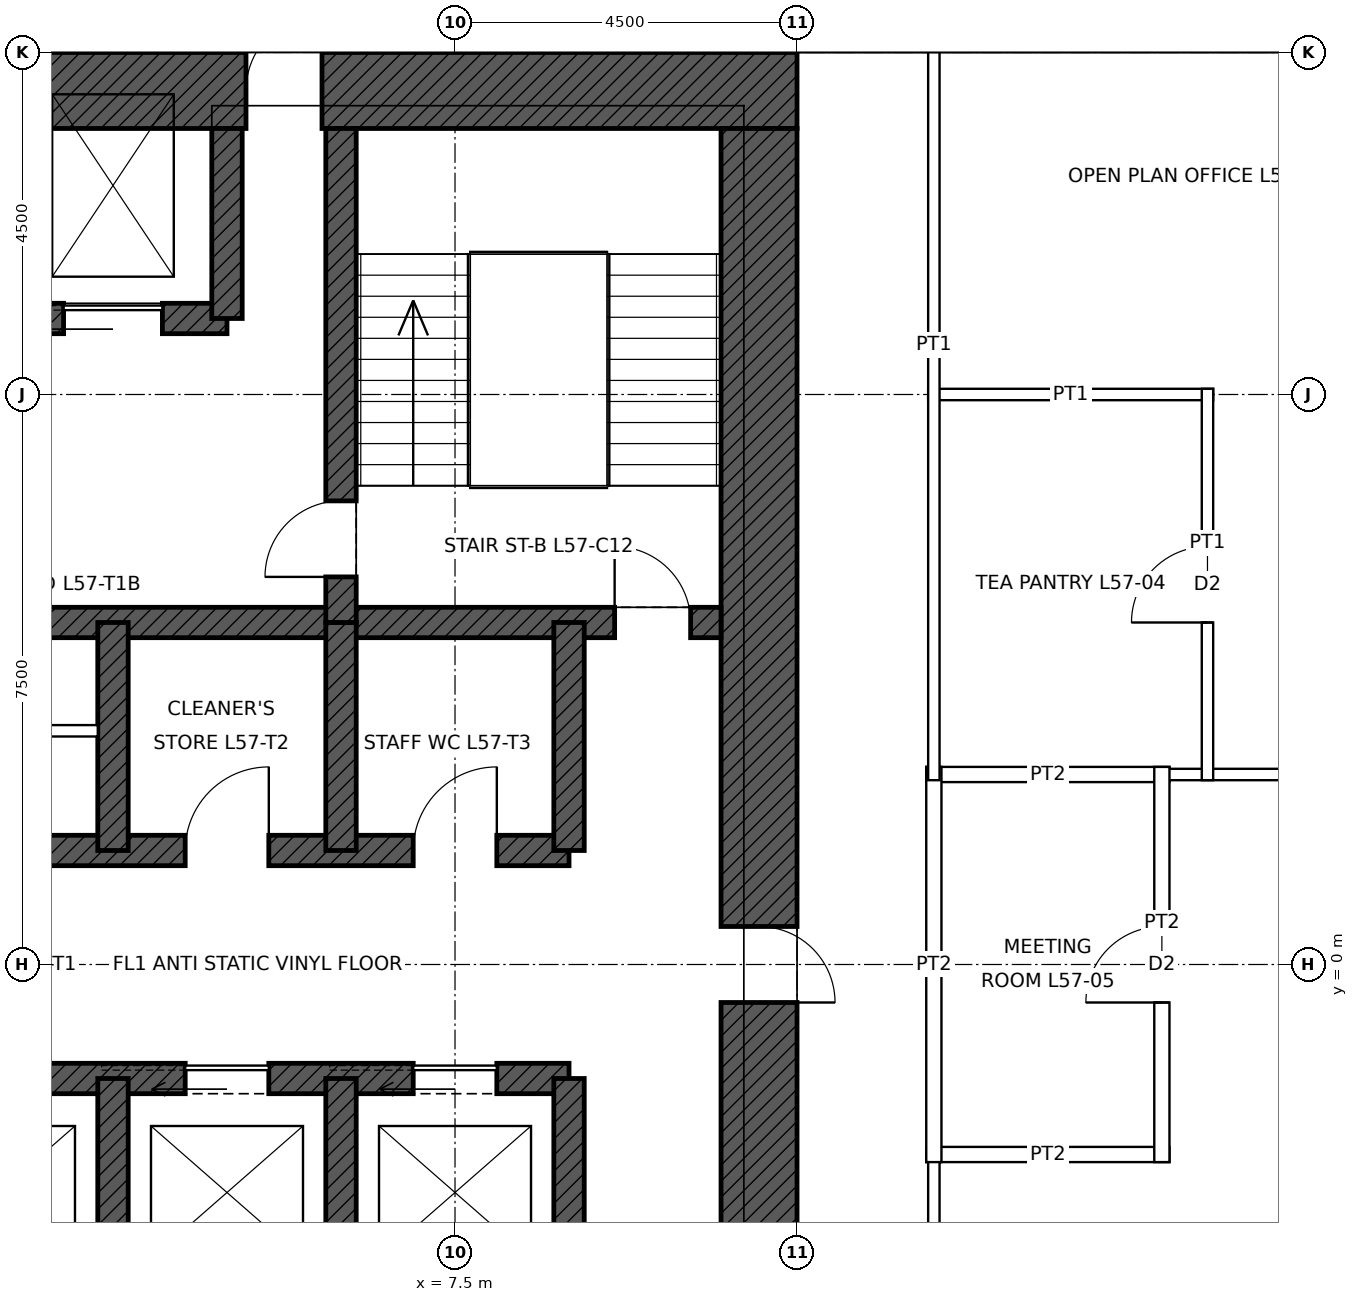
"""IFC4 building model, lengths in metres.
Left out: names, types, materials, properties, quantities, classifications, styles, units other than length and angle.
Written with IfcOpenShell. Run it as: python <this file> out.ifc"""

import sys

from ifc_helpers import new_model, si_unit, direction, frame, frame_2d, origin, place, context, subcontext, project, spatial, rectangle, extrude, element, fill, save


model = new_model("IFC4")
c1 = context("Model", 3, precision=1e-05, world=origin(), true_north=direction((0.0, 1.0)))
c2 = subcontext(c1, "Body", "Model", "MODEL_VIEW")
j1 = project(units=[si_unit("LENGTHUNIT", "METRE"), si_unit("PLANEANGLEUNIT", "RADIAN")], contexts=[c1])
p1 = place(None, origin())
s1 = spatial("IfcSite", under=j1, at=p1, CompositionType="ELEMENT")
p2 = place(p1, origin())
s2 = spatial("IfcBuilding", under=s1, at=p2, CompositionType="ELEMENT")
p3 = place(p2, frame((0.0, 0.0, 263.9)))
s3 = spatial("IfcBuildingStorey", under=s2, at=p3, CompositionType="ELEMENT", Elevation=263.9)
p4 = place(p3, frame((-12.0, 11.5, 0.0), z_axis=(0.0, 0.0, 1.0), x_axis=(1.0, 0.0, 0.0)))
e1 = element("IfcWall", 1, at=p4, inside=s3, PredefinedType="SHEAR", context=c2, shape_type="SweptSolid", body=[
    extrude(rectangle(XDim=24.0, YDim=1.0, at=frame_2d((12.0, 0.0))), origin(), (0.0, 0.0, 1.0), 4.0),
])
p5 = place(p4, frame((6.25, 0.0, 0.0)))
e2 = element("IfcOpeningElement", 2, at=p5, cuts=e1, PredefinedType="OPENING", context=c2, shape_type="SweptSolid", body=[
    extrude(rectangle(XDim=1.0, YDim=2.4, at=frame_2d((0.5, 1.2))), frame((0.0, 0.51, 0.0), z_axis=(0.0, -1.0, 0.0), x_axis=(1.0, 0.0, 0.0)), (0.0, 0.0, 1.0), 1.02),
])
p6 = place(p4, frame((16.75, 0.0, 0.0)))
e3 = element("IfcOpeningElement", 3, at=p6, cuts=e1, PredefinedType="OPENING", context=c2, shape_type="SweptSolid", body=[
    extrude(rectangle(XDim=1.0, YDim=2.4, at=frame_2d((0.5, 1.2))), frame((0.0, 0.51, 0.0), z_axis=(0.0, -1.0, 0.0), x_axis=(1.0, 0.0, 0.0)), (0.0, 0.0, 1.0), 1.02),
])
p7 = place(p3, frame((11.5, 11.0, 0.0), z_axis=(0.0, 0.0, 1.0), x_axis=(0.0, -1.0, 0.0)))
e4 = element("IfcWall", 4, at=p7, inside=s3, PredefinedType="SHEAR", context=c2, shape_type="SweptSolid", body=[
    extrude(rectangle(XDim=22.0, YDim=1.0, at=frame_2d((11.0, 0.0))), origin(), (0.0, 0.0, 1.0), 4.0),
])
p8 = place(p7, frame((10.5, 0.0, 0.0)))
e5 = element("IfcOpeningElement", 5, at=p8, cuts=e4, PredefinedType="OPENING", context=c2, shape_type="SweptSolid", body=[
    extrude(rectangle(XDim=1.0, YDim=2.4, at=frame_2d((0.5, 1.2))), frame((0.0, 0.51, 0.0), z_axis=(0.0, -1.0, 0.0), x_axis=(1.0, 0.0, 0.0)), (0.0, 0.0, 1.0), 1.02),
])
p9 = place(p3, frame((-11.0, 4.5, 0.0), z_axis=(0.0, 0.0, 1.0), x_axis=(1.0, 0.0, 0.0)))
e6 = element("IfcWall", 6, at=p9, inside=s3, PredefinedType="SHEAR", context=c2, shape_type="SweptSolid", body=[
    extrude(rectangle(XDim=22.0, YDim=0.4, at=frame_2d((11.0, 0.0))), origin(), (0.0, 0.0, 1.0), 4.0),
])
p10 = place(p9, frame((0.4, 0.0, 0.0)))
e7 = element("IfcOpeningElement", 7, at=p10, cuts=e6, PredefinedType="OPENING", context=c2, shape_type="SweptSolid", body=[
    extrude(rectangle(XDim=1.0, YDim=2.1, at=frame_2d((0.5, 1.05))), frame((0.0, 0.21, 0.0), z_axis=(0.0, -1.0, 0.0), x_axis=(1.0, 0.0, 0.0)), (0.0, 0.0, 1.0), 0.42),
])
p11 = place(p9, frame((20.6, 0.0, 0.0)))
e8 = element("IfcOpeningElement", 8, at=p11, cuts=e6, PredefinedType="OPENING", context=c2, shape_type="SweptSolid", body=[
    extrude(rectangle(XDim=1.0, YDim=2.1, at=frame_2d((0.5, 1.05))), frame((0.0, 0.21, 0.0), z_axis=(0.0, -1.0, 0.0), x_axis=(1.0, 0.0, 0.0)), (0.0, 0.0, 1.0), 0.42),
])
p12 = place(p3, frame((-9.0, 1.5, 0.0), z_axis=(0.0, 0.0, 1.0), x_axis=(1.0, 0.0, 0.0)))
e9 = element("IfcWall", 9, at=p12, inside=s3, PredefinedType="SHEAR", context=c2, shape_type="SweptSolid", body=[
    extrude(rectangle(XDim=18.0, YDim=0.4, at=frame_2d((9.0, 0.0))), origin(), (0.0, 0.0, 1.0), 4.0),
])
p13 = place(p12, frame((0.95, 0.0, 0.0)))
e10 = element("IfcOpeningElement", 10, at=p13, cuts=e9, PredefinedType="OPENING", context=c2, shape_type="SweptSolid", body=[
    extrude(rectangle(XDim=1.1, YDim=2.1, at=frame_2d((0.55, 1.05))), frame((0.0, 0.21, 0.0), z_axis=(0.0, -1.0, 0.0), x_axis=(1.0, 0.0, 0.0)), (0.0, 0.0, 1.0), 0.42),
])
p14 = place(p12, frame((3.95, 0.0, 0.0)))
e11 = element("IfcOpeningElement", 11, at=p14, cuts=e9, PredefinedType="OPENING", context=c2, shape_type="SweptSolid", body=[
    extrude(rectangle(XDim=1.1, YDim=2.1, at=frame_2d((0.55, 1.05))), frame((0.0, 0.21, 0.0), z_axis=(0.0, -1.0, 0.0), x_axis=(1.0, 0.0, 0.0)), (0.0, 0.0, 1.0), 0.42),
])
p15 = place(p12, frame((6.95, 0.0, 0.0)))
e12 = element("IfcOpeningElement", 12, at=p15, cuts=e9, PredefinedType="OPENING", context=c2, shape_type="SweptSolid", body=[
    extrude(rectangle(XDim=1.1, YDim=2.1, at=frame_2d((0.55, 1.05))), frame((0.0, 0.21, 0.0), z_axis=(0.0, -1.0, 0.0), x_axis=(1.0, 0.0, 0.0)), (0.0, 0.0, 1.0), 0.42),
])
p16 = place(p12, frame((9.95, 0.0, 0.0)))
e13 = element("IfcOpeningElement", 13, at=p16, cuts=e9, PredefinedType="OPENING", context=c2, shape_type="SweptSolid", body=[
    extrude(rectangle(XDim=1.1, YDim=2.1, at=frame_2d((0.55, 1.05))), frame((0.0, 0.21, 0.0), z_axis=(0.0, -1.0, 0.0), x_axis=(1.0, 0.0, 0.0)), (0.0, 0.0, 1.0), 0.42),
])
p17 = place(p12, frame((12.95, 0.0, 0.0)))
e14 = element("IfcOpeningElement", 14, at=p17, cuts=e9, PredefinedType="OPENING", context=c2, shape_type="SweptSolid", body=[
    extrude(rectangle(XDim=1.1, YDim=2.1, at=frame_2d((0.55, 1.05))), frame((0.0, 0.21, 0.0), z_axis=(0.0, -1.0, 0.0), x_axis=(1.0, 0.0, 0.0)), (0.0, 0.0, 1.0), 0.42),
])
p18 = place(p12, frame((15.95, 0.0, 0.0)))
e15 = element("IfcOpeningElement", 15, at=p18, cuts=e9, PredefinedType="OPENING", context=c2, shape_type="SweptSolid", body=[
    extrude(rectangle(XDim=1.1, YDim=2.1, at=frame_2d((0.55, 1.05))), frame((0.0, 0.21, 0.0), z_axis=(0.0, -1.0, 0.0), x_axis=(1.0, 0.0, 0.0)), (0.0, 0.0, 1.0), 0.42),
])
p19 = place(p3, frame((-9.0, -1.5, 0.0), z_axis=(0.0, 0.0, 1.0), x_axis=(1.0, 0.0, 0.0)))
e16 = element("IfcWall", 16, at=p19, inside=s3, PredefinedType="SHEAR", context=c2, shape_type="SweptSolid", body=[
    extrude(rectangle(XDim=18.0, YDim=0.4, at=frame_2d((9.0, 0.0))), origin(), (0.0, 0.0, 1.0), 4.0),
])
p20 = place(p19, frame((9.95, 0.0, 0.0)))
e17 = element("IfcOpeningElement", 17, at=p20, cuts=e16, PredefinedType="OPENING", context=c2, shape_type="SweptSolid", body=[
    extrude(rectangle(XDim=1.1, YDim=2.1, at=frame_2d((0.55, 1.05))), frame((0.0, 0.21, 0.0), z_axis=(0.0, -1.0, 0.0), x_axis=(1.0, 0.0, 0.0)), (0.0, 0.0, 1.0), 0.42),
])
p21 = place(p19, frame((12.95, 0.0, 0.0)))
e18 = element("IfcOpeningElement", 18, at=p21, cuts=e16, PredefinedType="OPENING", context=c2, shape_type="SweptSolid", body=[
    extrude(rectangle(XDim=1.1, YDim=2.1, at=frame_2d((0.55, 1.05))), frame((0.0, 0.21, 0.0), z_axis=(0.0, -1.0, 0.0), x_axis=(1.0, 0.0, 0.0)), (0.0, 0.0, 1.0), 0.42),
])
p22 = place(p19, frame((15.95, 0.0, 0.0)))
e19 = element("IfcOpeningElement", 19, at=p22, cuts=e16, PredefinedType="OPENING", context=c2, shape_type="SweptSolid", body=[
    extrude(rectangle(XDim=1.1, YDim=2.1, at=frame_2d((0.55, 1.05))), frame((0.0, 0.21, 0.0), z_axis=(0.0, -1.0, 0.0), x_axis=(1.0, 0.0, 0.0)), (0.0, 0.0, 1.0), 0.42),
])
p23 = place(p19, frame((0.95, 0.0, 0.0)))
e20 = element("IfcOpeningElement", 20, at=p23, cuts=e16, PredefinedType="OPENING", context=c2, shape_type="SweptSolid", body=[
    extrude(rectangle(XDim=1.1, YDim=2.1, at=frame_2d((0.55, 1.05))), frame((0.0, 0.21, 0.0), z_axis=(0.0, -1.0, 0.0), x_axis=(1.0, 0.0, 0.0)), (0.0, 0.0, 1.0), 0.42),
])
p24 = place(p19, frame((3.95, 0.0, 0.0)))
e21 = element("IfcOpeningElement", 21, at=p24, cuts=e16, PredefinedType="OPENING", context=c2, shape_type="SweptSolid", body=[
    extrude(rectangle(XDim=1.1, YDim=2.1, at=frame_2d((0.55, 1.05))), frame((0.0, 0.21, 0.0), z_axis=(0.0, -1.0, 0.0), x_axis=(1.0, 0.0, 0.0)), (0.0, 0.0, 1.0), 0.42),
])
p25 = place(p19, frame((6.95, 0.0, 0.0)))
e22 = element("IfcOpeningElement", 22, at=p25, cuts=e16, PredefinedType="OPENING", context=c2, shape_type="SweptSolid", body=[
    extrude(rectangle(XDim=1.1, YDim=2.1, at=frame_2d((0.55, 1.05))), frame((0.0, 0.21, 0.0), z_axis=(0.0, -1.0, 0.0), x_axis=(1.0, 0.0, 0.0)), (0.0, 0.0, 1.0), 0.42),
])
p26 = place(p3, frame((-4.5, 8.5, 0.0), z_axis=(0.0, 0.0, 1.0), x_axis=(1.0, 0.0, 0.0)))
e23 = element("IfcWall", 23, at=p26, inside=s3, PredefinedType="SHEAR", context=c2, shape_type="SweptSolid", body=[
    extrude(rectangle(XDim=9.0, YDim=0.4, at=frame_2d((4.5, 0.0))), origin(), (0.0, 0.0, 1.0), 4.0),
])
p27 = place(p26, frame((0.85, 0.0, 0.0)))
e24 = element("IfcOpeningElement", 24, at=p27, cuts=e23, PredefinedType="OPENING", context=c2, shape_type="SweptSolid", body=[
    extrude(rectangle(XDim=1.3, YDim=2.4, at=frame_2d((0.65, 1.2))), frame((0.0, 0.21, 0.0), z_axis=(0.0, -1.0, 0.0), x_axis=(1.0, 0.0, 0.0)), (0.0, 0.0, 1.0), 0.42),
])
p28 = place(p26, frame((6.85, 0.0, 0.0)))
e25 = element("IfcOpeningElement", 25, at=p28, cuts=e23, PredefinedType="OPENING", context=c2, shape_type="SweptSolid", body=[
    extrude(rectangle(XDim=1.3, YDim=2.4, at=frame_2d((0.65, 1.2))), frame((0.0, 0.21, 0.0), z_axis=(0.0, -1.0, 0.0), x_axis=(1.0, 0.0, 0.0)), (0.0, 0.0, 1.0), 0.42),
])
p29 = place(p26, frame((3.85, 0.0, 0.0)))
e26 = element("IfcOpeningElement", 26, at=p29, cuts=e23, PredefinedType="OPENING", context=c2, shape_type="SweptSolid", body=[
    extrude(rectangle(XDim=1.3, YDim=2.4, at=frame_2d((0.65, 1.2))), frame((0.0, 0.21, 0.0), z_axis=(0.0, -1.0, 0.0), x_axis=(1.0, 0.0, 0.0)), (0.0, 0.0, 1.0), 0.42),
])
for number, where, z_axis, x_axis in (
    (27, (9.0, 1.5, 0.0), (0.0, 0.0, 1.0), (0.0, 1.0, 0.0)),
    (28, (9.0, -4.5, 0.0), (0.0, 0.0, 1.0), (0.0, 1.0, 0.0)),
    (29, (3.0, 1.5, 0.0), (0.0, 0.0, 1.0), (0.0, 1.0, 0.0)),
    (30, (6.0, 1.5, 0.0), (0.0, 0.0, 1.0), (0.0, 1.0, 0.0)),
    (31, (3.0, -4.5, 0.0), (0.0, 0.0, 1.0), (0.0, 1.0, 0.0)),
    (32, (6.0, -4.5, 0.0), (0.0, 0.0, 1.0), (0.0, 1.0, 0.0)),
):
    element("IfcWall", number, at=place(p3, frame(where, z_axis=z_axis, x_axis=x_axis)), inside=s3, PredefinedType="SHEAR", context=c2, shape_type="SweptSolid", body=[
        extrude(rectangle(XDim=3.0, YDim=0.4, at=frame_2d((1.5, 0.0))), origin(), (0.0, 0.0, 1.0), 4.0),
    ])
p30 = place(p3, frame((6.0, 4.5, 0.0), z_axis=(0.0, 0.0, 1.0), x_axis=(0.0, 1.0, 0.0)))
e33 = element("IfcWall", 33, at=p30, inside=s3, PredefinedType="SHEAR", context=c2, shape_type="SweptSolid", body=[
    extrude(rectangle(XDim=6.5, YDim=0.4, at=frame_2d((3.25, 0.0))), origin(), (0.0, 0.0, 1.0), 4.0),
])
p31 = place(p30, frame((0.6, 0.0, 0.0)))
e34 = element("IfcOpeningElement", 34, at=p31, cuts=e33, PredefinedType="OPENING", context=c2, shape_type="SweptSolid", body=[
    extrude(rectangle(XDim=1.0, YDim=2.1, at=frame_2d((0.5, 1.05))), frame((0.0, 0.21, 0.0), z_axis=(0.0, -1.0, 0.0), x_axis=(1.0, 0.0, 0.0)), (0.0, 0.0, 1.0), 0.42),
])
p32 = place(p3, frame((4.5, 8.5, 0.0), z_axis=(0.0, 0.0, 1.0), x_axis=(0.0, 1.0, 0.0)))
e35 = element("IfcWall", 35, at=p32, inside=s3, PredefinedType="SHEAR", context=c2, shape_type="SweptSolid", body=[
    extrude(rectangle(XDim=2.5, YDim=0.4, at=frame_2d((1.25, 0.0))), origin(), (0.0, 0.0, 1.0), 4.0),
])
for number, where, z_axis, x_axis in (
    (36, (13.7, -2.5, 0.0), (0.0, 0.0, 1.0), (1.0, 0.0, 0.0)),
    (37, (13.7, 2.5, 0.0), (0.0, 0.0, 1.0), (1.0, 0.0, 0.0)),
):
    element("IfcWall", number, at=place(p3, frame(where, z_axis=z_axis, x_axis=x_axis)), inside=s3, PredefinedType="PARTITIONING", context=c2, shape_type="SweptSolid", body=[
        extrude(rectangle(XDim=3.2, YDim=0.2, at=frame_2d((1.6, 0.0))), origin(), (0.0, 0.0, 1.0), 3.85),
    ])
p33 = place(p3, frame((16.725, 2.5, 0.0), z_axis=(0.0, 0.0, 1.0), x_axis=(1.0, 0.0, 0.0)))
e38 = element("IfcWall", 38, at=p33, inside=s3, PredefinedType="PARTITIONING", context=c2, shape_type="SweptSolid", body=[
    extrude(rectangle(XDim=3.925, YDim=0.15, at=frame_2d((1.962, 0.0))), origin(), (0.0, 0.0, 1.0), 3.85),
])
p34 = place(p3, frame((13.725, 7.5, 0.0), z_axis=(0.0, 0.0, 1.0), x_axis=(1.0, 0.0, 0.0)))
e39 = element("IfcWall", 39, at=p34, inside=s3, PredefinedType="PARTITIONING", context=c2, shape_type="SweptSolid", body=[
    extrude(rectangle(XDim=3.75, YDim=0.15, at=frame_2d((1.875, 0.0))), origin(), (0.0, 0.0, 1.0), 3.243),
])
p35 = place(p3, frame((13.8, -13.875, 0.0), z_axis=(0.0, 0.0, 1.0), x_axis=(0.0, 1.0, 0.0)))
e40 = element("IfcWall", 40, at=p35, inside=s3, PredefinedType="PARTITIONING", context=c2, shape_type="SweptSolid", body=[
    extrude(rectangle(XDim=11.45, YDim=0.15, at=frame_2d((5.725, 0.0))), origin(), (0.0, 0.0, 1.0), 3.85),
])
p36 = place(p35, frame((5.225, 0.0, 0.0)))
e41 = element("IfcOpeningElement", 41, at=p36, cuts=e40, PredefinedType="OPENING", context=c2, shape_type="SweptSolid", body=[
    extrude(rectangle(XDim=1.0, YDim=2.4, at=frame_2d((0.5, 1.2))), frame((0.0, 0.085, 0.0), z_axis=(0.0, -1.0, 0.0), x_axis=(1.0, 0.0, 0.0)), (0.0, 0.0, 1.0), 0.17),
])
p37 = place(p3, frame((13.8, -2.6, 0.0), z_axis=(0.0, 0.0, 1.0), x_axis=(0.0, 1.0, 0.0)))
e42 = element("IfcWall", 42, at=p37, inside=s3, PredefinedType="PARTITIONING", context=c2, shape_type="SweptSolid", body=[
    extrude(rectangle(XDim=5.2, YDim=0.2, at=frame_2d((2.6, 0.0))), origin(), (0.0, 0.0, 1.0), 3.85),
])
p38 = place(p3, frame((13.8, 2.425, 0.0), z_axis=(0.0, 0.0, 1.0), x_axis=(0.0, 1.0, 0.0)))
e43 = element("IfcWall", 43, at=p38, inside=s3, PredefinedType="PARTITIONING", context=c2, shape_type="SweptSolid", body=[
    extrude(rectangle(XDim=11.45, YDim=0.15, at=frame_2d((5.725, 0.0))), origin(), (0.0, 0.0, 1.0), 3.85),
])
p39 = place(p3, frame((16.8, -2.6, 0.0), z_axis=(0.0, 0.0, 1.0), x_axis=(0.0, 1.0, 0.0)))
e44 = element("IfcWall", 44, at=p39, inside=s3, PredefinedType="PARTITIONING", context=c2, shape_type="SweptSolid", body=[
    extrude(rectangle(XDim=5.2, YDim=0.2, at=frame_2d((2.6, 0.0))), origin(), (0.0, 0.0, 1.0), 3.85),
])
p40 = place(p39, frame((2.1, 0.0, 0.0)))
e45 = element("IfcOpeningElement", 45, at=p40, cuts=e44, PredefinedType="OPENING", context=c2, shape_type="SweptSolid", body=[
    extrude(rectangle(XDim=1.0, YDim=2.1, at=frame_2d((0.5, 1.05))), frame((0.0, 0.11, 0.0), z_axis=(0.0, -1.0, 0.0), x_axis=(1.0, 0.0, 0.0)), (0.0, 0.0, 1.0), 0.22),
])
p41 = place(p3, frame((17.4, 2.425, 0.0), z_axis=(0.0, 0.0, 1.0), x_axis=(0.0, 1.0, 0.0)))
e46 = element("IfcWall", 46, at=p41, inside=s3, PredefinedType="PARTITIONING", context=c2, shape_type="SweptSolid", body=[
    extrude(rectangle(XDim=5.15, YDim=0.15, at=frame_2d((2.575, 0.0))), origin(), (0.0, 0.0, 1.0), 3.85),
])
p42 = place(p41, frame((2.075, 0.0, 0.0)))
e47 = element("IfcOpeningElement", 47, at=p42, cuts=e46, PredefinedType="OPENING", context=c2, shape_type="SweptSolid", body=[
    extrude(rectangle(XDim=1.0, YDim=2.1, at=frame_2d((0.5, 1.05))), frame((0.0, 0.085, 0.0), z_axis=(0.0, -1.0, 0.0), x_axis=(1.0, 0.0, 0.0)), (0.0, 0.0, 1.0), 0.17),
])
p43 = place(p3, frame((0.2, 3.075, 0.0), z_axis=(0.0, 0.0, 1.0), x_axis=(1.0, 0.0, 0.0)))
e48 = element("IfcWall", 48, at=p43, inside=s3, PredefinedType="PARTITIONING", context=c2, shape_type="SweptSolid", body=[
    extrude(rectangle(XDim=2.6, YDim=0.15, at=frame_2d((1.3, 0.0))), origin(), (0.0, 0.0, 1.0), 3.75),
])
p44 = place(p43, frame((0.85, 0.0, 0.0)))
e49 = element("IfcOpeningElement", 49, at=p44, cuts=e48, PredefinedType="OPENING", context=c2, shape_type="SweptSolid", body=[
    extrude(rectangle(XDim=0.9, YDim=2.1, at=frame_2d((0.45, 1.05))), frame((0.0, 0.085, 0.0), z_axis=(0.0, -1.0, 0.0), x_axis=(1.0, 0.0, 0.0)), (0.0, 0.0, 1.0), 0.17),
])
p45 = place(p11, origin())
e50 = element("IfcDoor", 50, at=p45, inside=s3, OperationType="SINGLE_SWING_LEFT", PredefinedType="DOOR", context=c2, shape_type="SweptSolid", body=[
    extrude(rectangle(XDim=1.0, YDim=2.1, at=frame_2d((0.5, 1.05))), frame((0.0, 0.025, 0.0), z_axis=(0.0, -1.0, 0.0), x_axis=(1.0, 0.0, 0.0)), (0.0, 0.0, 1.0), 0.05),
])
fill(e8, e50)
p46 = place(p31, origin())
e51 = element("IfcDoor", 51, at=p46, inside=s3, OperationType="SINGLE_SWING_LEFT", PredefinedType="DOOR", context=c2, shape_type="SweptSolid", body=[
    extrude(rectangle(XDim=1.0, YDim=2.1, at=frame_2d((0.5, 1.05))), frame((0.0, 0.025, 0.0), z_axis=(0.0, -1.0, 0.0), x_axis=(1.0, 0.0, 0.0)), (0.0, 0.0, 1.0), 0.05),
])
fill(e34, e51)
p47 = place(p6, origin())
e52 = element("IfcDoor", 52, at=p47, inside=s3, OperationType="SINGLE_SWING_RIGHT", PredefinedType="DOOR", context=c2, shape_type="SweptSolid", body=[
    extrude(rectangle(XDim=1.0, YDim=2.4, at=frame_2d((0.5, 1.2))), frame((0.0, 0.485, 0.0), z_axis=(0.0, -1.0, 0.0), x_axis=(1.0, 0.0, 0.0)), (0.0, 0.0, 1.0), 0.05),
])
fill(e3, e52)
p48 = place(p8, origin())
e53 = element("IfcDoor", 53, at=p48, inside=s3, OperationType="SINGLE_SWING_RIGHT", PredefinedType="DOOR", context=c2, shape_type="SweptSolid", body=[
    extrude(rectangle(XDim=1.0, YDim=2.4, at=frame_2d((0.5, 1.2))), frame((0.0, 0.485, 0.0), z_axis=(0.0, -1.0, 0.0), x_axis=(1.0, 0.0, 0.0)), (0.0, 0.0, 1.0), 0.05),
])
fill(e5, e53)
p49 = place(p28, origin())
e54 = element("IfcDoor", 54, at=p49, inside=s3, OperationType="SLIDING_TO_LEFT", PredefinedType="DOOR", context=c2, shape_type="SweptSolid", body=[
    extrude(rectangle(XDim=1.3, YDim=2.4, at=frame_2d((0.65, 1.2))), frame((0.0, 0.025, 0.0), z_axis=(0.0, -1.0, 0.0), x_axis=(1.0, 0.0, 0.0)), (0.0, 0.0, 1.0), 0.05),
])
fill(e25, e54)
p50 = place(p21, origin())
e55 = element("IfcDoor", 55, at=p50, inside=s3, OperationType="SLIDING_TO_LEFT", PredefinedType="DOOR", context=c2, shape_type="SweptSolid", body=[
    extrude(rectangle(XDim=1.1, YDim=2.1, at=frame_2d((0.55, 1.05))), frame((0.0, 0.025, 0.0), z_axis=(0.0, -1.0, 0.0), x_axis=(1.0, 0.0, 0.0)), (0.0, 0.0, 1.0), 0.05),
])
fill(e18, e55)
p51 = place(p22, origin())
e56 = element("IfcDoor", 56, at=p51, inside=s3, OperationType="SLIDING_TO_LEFT", PredefinedType="DOOR", context=c2, shape_type="SweptSolid", body=[
    extrude(rectangle(XDim=1.1, YDim=2.1, at=frame_2d((0.55, 1.05))), frame((0.0, 0.025, 0.0), z_axis=(0.0, -1.0, 0.0), x_axis=(1.0, 0.0, 0.0)), (0.0, 0.0, 1.0), 0.05),
])
fill(e19, e56)
p52 = place(p17, origin())
e57 = element("IfcDoor", 57, at=p52, inside=s3, OperationType="SINGLE_SWING_RIGHT", PredefinedType="DOOR", context=c2, shape_type="SweptSolid", body=[
    extrude(rectangle(XDim=1.1, YDim=2.1, at=frame_2d((0.55, 1.05))), frame((0.0, 0.025, 0.0), z_axis=(0.0, -1.0, 0.0), x_axis=(1.0, 0.0, 0.0)), (0.0, 0.0, 1.0), 0.05),
])
fill(e14, e57)
p53 = place(p18, origin())
e58 = element("IfcDoor", 58, at=p53, inside=s3, OperationType="SINGLE_SWING_RIGHT", PredefinedType="DOOR", context=c2, shape_type="SweptSolid", body=[
    extrude(rectangle(XDim=1.1, YDim=2.1, at=frame_2d((0.55, 1.05))), frame((0.0, 0.025, 0.0), z_axis=(0.0, -1.0, 0.0), x_axis=(1.0, 0.0, 0.0)), (0.0, 0.0, 1.0), 0.05),
])
fill(e15, e58)
p54 = place(p42, origin())
e59 = element("IfcDoor", 59, at=p54, inside=s3, OperationType="SINGLE_SWING_LEFT", PredefinedType="DOOR", context=c2, shape_type="SweptSolid", body=[
    extrude(rectangle(XDim=1.0, YDim=2.1, at=frame_2d((0.5, 1.05))), frame((0.0, 0.025, 0.0), z_axis=(0.0, -1.0, 0.0), x_axis=(1.0, 0.0, 0.0)), (0.0, 0.0, 1.0), 0.05),
])
fill(e47, e59)
p55 = place(p40, origin())
e60 = element("IfcDoor", 60, at=p55, inside=s3, OperationType="SINGLE_SWING_LEFT", PredefinedType="DOOR", context=c2, shape_type="SweptSolid", body=[
    extrude(rectangle(XDim=1.0, YDim=2.1, at=frame_2d((0.5, 1.05))), frame((0.0, 0.025, 0.0), z_axis=(0.0, -1.0, 0.0), x_axis=(1.0, 0.0, 0.0)), (0.0, 0.0, 1.0), 0.05),
])
fill(e45, e60)
save(model, sys.argv[1])
